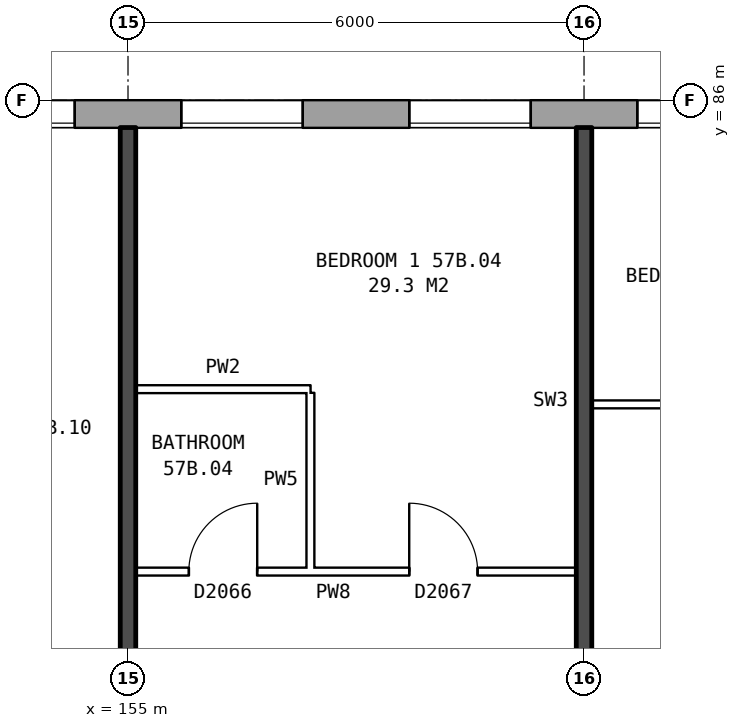
"""IFC4 building model, lengths in metres.
Left out: names, types, materials, properties, quantities, classifications, styles, units other than length and angle.
Written with IfcOpenShell. Run it as: python <this file> out.ifc"""

import sys

from ifc_helpers import new_model, si_unit, direction, frame, frame_2d, origin, place, context, subcontext, project, spatial, rectangle, extrude, element, fill, save


model = new_model("IFC4")
c1 = context("Model", 3, precision=1e-05, world=origin(), true_north=direction((0.0, 1.0)))
c2 = subcontext(c1, "Body", "Model", "MODEL_VIEW")
j1 = project(units=[si_unit("LENGTHUNIT", "METRE"), si_unit("PLANEANGLEUNIT", "RADIAN")], contexts=[c1])
p1 = place(None, origin())
s1 = spatial("IfcSite", under=j1, at=p1, CompositionType="ELEMENT")
p2 = place(p1, origin())
s2 = spatial("IfcBuilding", under=s1, at=p2, CompositionType="ELEMENT")
p3 = place(p2, frame((0.0, 0.0, 202.8)))
s3 = spatial("IfcBuildingStorey", under=s2, at=p3, CompositionType="ELEMENT", Elevation=202.8)
p4 = place(p3, frame((165.925, 85.82, 0.0), z_axis=(0.0, 0.0, 1.0), x_axis=(-1.0, 0.0, 0.0)))
e1 = element("IfcWall", 1, at=p4, inside=s3, PredefinedType="STANDARD", context=c2, shape_type="SweptSolid", body=[
    extrude(rectangle(XDim=33.875, YDim=0.36, at=frame_2d((16.938, 0.0))), origin(), (0.0, 0.0, 1.0), 2.85),
])
p5 = place(p4, frame((2.625, 0.0, 0.8)))
e2 = element("IfcOpeningElement", 2, at=p5, cuts=e1, PredefinedType="OPENING", context=c2, shape_type="SweptSolid", body=[
    extrude(rectangle(XDim=1.6, YDim=1.8, at=frame_2d((0.8, 0.9))), frame((0.0, 0.19, 0.0), z_axis=(0.0, -1.0, 0.0), x_axis=(1.0, 0.0, 0.0)), (0.0, 0.0, 1.0), 0.38),
])
p6 = place(p4, frame((5.625, 0.0, 0.8)))
e3 = element("IfcOpeningElement", 3, at=p6, cuts=e1, PredefinedType="OPENING", context=c2, shape_type="SweptSolid", body=[
    extrude(rectangle(XDim=1.6, YDim=1.8, at=frame_2d((0.8, 0.9))), frame((0.0, 0.19, 0.0), z_axis=(0.0, -1.0, 0.0), x_axis=(1.0, 0.0, 0.0)), (0.0, 0.0, 1.0), 0.38),
])
p7 = place(p4, frame((8.625, 0.0, 0.8)))
e4 = element("IfcOpeningElement", 4, at=p7, cuts=e1, PredefinedType="OPENING", context=c2, shape_type="SweptSolid", body=[
    extrude(rectangle(XDim=1.6, YDim=1.8, at=frame_2d((0.8, 0.9))), frame((0.0, 0.19, 0.0), z_axis=(0.0, -1.0, 0.0), x_axis=(1.0, 0.0, 0.0)), (0.0, 0.0, 1.0), 0.38),
])
p8 = place(p4, frame((11.625, 0.0, 0.8)))
e5 = element("IfcOpeningElement", 5, at=p8, cuts=e1, PredefinedType="OPENING", context=c2, shape_type="SweptSolid", body=[
    extrude(rectangle(XDim=1.6, YDim=1.8, at=frame_2d((0.8, 0.9))), frame((0.0, 0.19, 0.0), z_axis=(0.0, -1.0, 0.0), x_axis=(1.0, 0.0, 0.0)), (0.0, 0.0, 1.0), 0.38),
])
p9 = place(p4, frame((14.625, 0.0, 0.8)))
e6 = element("IfcOpeningElement", 6, at=p9, cuts=e1, PredefinedType="OPENING", context=c2, shape_type="SweptSolid", body=[
    extrude(rectangle(XDim=1.6, YDim=1.8, at=frame_2d((0.8, 0.9))), frame((0.0, 0.19, 0.0), z_axis=(0.0, -1.0, 0.0), x_axis=(1.0, 0.0, 0.0)), (0.0, 0.0, 1.0), 0.38),
])
p10 = place(p4, frame((17.625, 0.0, 0.8)))
e7 = element("IfcOpeningElement", 7, at=p10, cuts=e1, PredefinedType="OPENING", context=c2, shape_type="SweptSolid", body=[
    extrude(rectangle(XDim=1.6, YDim=1.8, at=frame_2d((0.8, 0.9))), frame((0.0, 0.19, 0.0), z_axis=(0.0, -1.0, 0.0), x_axis=(1.0, 0.0, 0.0)), (0.0, 0.0, 1.0), 0.38),
])
p11 = place(p4, frame((20.625, 0.0, 0.8)))
e8 = element("IfcOpeningElement", 8, at=p11, cuts=e1, PredefinedType="OPENING", context=c2, shape_type="SweptSolid", body=[
    extrude(rectangle(XDim=1.6, YDim=1.8, at=frame_2d((0.8, 0.9))), frame((0.0, 0.19, 0.0), z_axis=(0.0, -1.0, 0.0), x_axis=(1.0, 0.0, 0.0)), (0.0, 0.0, 1.0), 0.38),
])
p12 = place(p4, frame((23.625, 0.0, 0.8)))
e9 = element("IfcOpeningElement", 9, at=p12, cuts=e1, PredefinedType="OPENING", context=c2, shape_type="SweptSolid", body=[
    extrude(rectangle(XDim=1.6, YDim=1.8, at=frame_2d((0.8, 0.9))), frame((0.0, 0.19, 0.0), z_axis=(0.0, -1.0, 0.0), x_axis=(1.0, 0.0, 0.0)), (0.0, 0.0, 1.0), 0.38),
])
p13 = place(p4, frame((26.625, 0.0, 0.8)))
e10 = element("IfcOpeningElement", 10, at=p13, cuts=e1, PredefinedType="OPENING", context=c2, shape_type="SweptSolid", body=[
    extrude(rectangle(XDim=1.6, YDim=1.8, at=frame_2d((0.8, 0.9))), frame((0.0, 0.19, 0.0), z_axis=(0.0, -1.0, 0.0), x_axis=(1.0, 0.0, 0.0)), (0.0, 0.0, 1.0), 0.38),
])
p14 = place(p4, frame((29.625, 0.0, 0.8)))
e11 = element("IfcOpeningElement", 11, at=p14, cuts=e1, PredefinedType="OPENING", context=c2, shape_type="SweptSolid", body=[
    extrude(rectangle(XDim=1.6, YDim=1.8, at=frame_2d((0.8, 0.9))), frame((0.0, 0.19, 0.0), z_axis=(0.0, -1.0, 0.0), x_axis=(1.0, 0.0, 0.0)), (0.0, 0.0, 1.0), 0.38),
])
p15 = place(p3, frame((155.1, 79.8, 0.0), z_axis=(0.0, 0.0, 1.0), x_axis=(1.0, 0.0, 0.0)))
e12 = element("IfcWall", 12, at=p15, inside=s3, PredefinedType="PARTITIONING", context=c2, shape_type="SweptSolid", body=[
    extrude(rectangle(XDim=5.8, YDim=0.1, at=frame_2d((2.9, 0.0))), origin(), (0.0, 0.0, 1.0), 2.85),
])
p16 = place(p15, frame((3.6, 0.0, 0.0)))
e13 = element("IfcOpeningElement", 13, at=p16, cuts=e12, PredefinedType="OPENING", context=c2, shape_type="SweptSolid", body=[
    extrude(rectangle(XDim=0.9, YDim=2.1, at=frame_2d((0.45, 1.05))), frame((0.0, 0.06, 0.0), z_axis=(0.0, -1.0, 0.0), x_axis=(1.0, 0.0, 0.0)), (0.0, 0.0, 1.0), 0.12),
])
p17 = place(p15, frame((0.7, 0.0, 0.0)))
e14 = element("IfcOpeningElement", 14, at=p17, cuts=e12, PredefinedType="OPENING", context=c2, shape_type="SweptSolid", body=[
    extrude(rectangle(XDim=0.9, YDim=2.1, at=frame_2d((0.45, 1.05))), frame((0.0, 0.06, 0.0), z_axis=(0.0, -1.0, 0.0), x_axis=(1.0, 0.0, 0.0)), (0.0, 0.0, 1.0), 0.12),
])
p18 = place(p3, frame((161.1, 82.0, 0.0), z_axis=(0.0, 0.0, 1.0), x_axis=(1.0, 0.0, 0.0)))
e15 = element("IfcWall", 15, at=p18, inside=s3, PredefinedType="PARTITIONING", context=c2, shape_type="SweptSolid", body=[
    extrude(rectangle(XDim=7.54, YDim=0.1, at=frame_2d((3.77, 0.0))), origin(), (0.0, 0.0, 1.0), 2.85),
])
p19 = place(p18, frame((3.32, 0.0, 0.0)))
e16 = element("IfcOpeningElement", 16, at=p19, cuts=e15, PredefinedType="OPENING", context=c2, shape_type="SweptSolid", body=[
    extrude(rectangle(XDim=0.9, YDim=2.1, at=frame_2d((0.45, 1.05))), frame((0.0, 0.06, 0.0), z_axis=(0.0, -1.0, 0.0), x_axis=(1.0, 0.0, 0.0)), (0.0, 0.0, 1.0), 0.12),
])
p20 = place(p3, frame((155.1, 82.2, 0.0), z_axis=(0.0, 0.0, 1.0), x_axis=(1.0, 0.0, 0.0)))
e17 = element("IfcWall", 17, at=p20, inside=s3, PredefinedType="PARTITIONING", context=c2, shape_type="SweptSolid", body=[
    extrude(rectangle(XDim=2.3, YDim=0.1, at=frame_2d((1.15, 0.0))), origin(), (0.0, 0.0, 1.0), 2.85),
])
p21 = place(p3, frame((155.0, 71.2, 0.0), z_axis=(0.0, 0.0, 1.0), x_axis=(0.0, 1.0, 0.0)))
e18 = element("IfcWall", 18, at=p21, inside=s3, PredefinedType="SOLIDWALL", context=c2, shape_type="SweptSolid", body=[
    extrude(rectangle(XDim=14.44, YDim=0.2, at=frame_2d((7.22, 0.0))), origin(), (0.0, 0.0, 1.0), 2.85),
])
p22 = place(p3, frame((157.4, 79.85, 0.0), z_axis=(0.0, 0.0, 1.0), x_axis=(0.0, 1.0, 0.0)))
e19 = element("IfcWall", 19, at=p22, inside=s3, PredefinedType="PARTITIONING", context=c2, shape_type="SweptSolid", body=[
    extrude(rectangle(XDim=2.3, YDim=0.1, at=frame_2d((1.15, 0.0))), origin(), (0.0, 0.0, 1.0), 2.85),
])
p23 = place(p3, frame((161.0, 76.2, 0.0), z_axis=(0.0, 0.0, 1.0), x_axis=(0.0, 1.0, 0.0)))
e20 = element("IfcWall", 20, at=p23, inside=s3, PredefinedType="SOLIDWALL", context=c2, shape_type="SweptSolid", body=[
    extrude(rectangle(XDim=9.44, YDim=0.2, at=frame_2d((4.72, 0.0))), origin(), (0.0, 0.0, 1.0), 2.85),
])
p24 = place(p23, frame((1.35, 0.0, 0.0)))
e21 = element("IfcOpeningElement", 21, at=p24, cuts=e20, PredefinedType="OPENING", context=c2, shape_type="SweptSolid", body=[
    extrude(rectangle(XDim=0.9, YDim=2.1, at=frame_2d((0.45, 1.05))), frame((0.0, 0.11, 0.0), z_axis=(0.0, -1.0, 0.0), x_axis=(1.0, 0.0, 0.0)), (0.0, 0.0, 1.0), 0.22),
])
p25 = place(p5, origin())
e22 = element("IfcWindow", 22, at=p25, inside=s3, PartitioningType="SINGLE_PANEL", PredefinedType="WINDOW", context=c2, shape_type="SweptSolid", body=[
    extrude(rectangle(XDim=1.6, YDim=1.8, at=frame_2d((0.8, 0.9))), frame((0.0, 0.15, 0.0), z_axis=(0.0, -1.0, 0.0), x_axis=(1.0, 0.0, 0.0)), (0.0, 0.0, 1.0), 0.06),
])
fill(e2, e22)
p26 = place(p6, origin())
e23 = element("IfcWindow", 23, at=p26, inside=s3, PartitioningType="SINGLE_PANEL", PredefinedType="WINDOW", context=c2, shape_type="SweptSolid", body=[
    extrude(rectangle(XDim=1.6, YDim=1.8, at=frame_2d((0.8, 0.9))), frame((0.0, 0.15, 0.0), z_axis=(0.0, -1.0, 0.0), x_axis=(1.0, 0.0, 0.0)), (0.0, 0.0, 1.0), 0.06),
])
fill(e3, e23)
p27 = place(p7, origin())
e24 = element("IfcWindow", 24, at=p27, inside=s3, PartitioningType="SINGLE_PANEL", PredefinedType="WINDOW", context=c2, shape_type="SweptSolid", body=[
    extrude(rectangle(XDim=1.6, YDim=1.8, at=frame_2d((0.8, 0.9))), frame((0.0, 0.15, 0.0), z_axis=(0.0, -1.0, 0.0), x_axis=(1.0, 0.0, 0.0)), (0.0, 0.0, 1.0), 0.06),
])
fill(e4, e24)
p28 = place(p8, origin())
e25 = element("IfcWindow", 25, at=p28, inside=s3, PartitioningType="SINGLE_PANEL", PredefinedType="WINDOW", context=c2, shape_type="SweptSolid", body=[
    extrude(rectangle(XDim=1.6, YDim=1.8, at=frame_2d((0.8, 0.9))), frame((0.0, 0.15, 0.0), z_axis=(0.0, -1.0, 0.0), x_axis=(1.0, 0.0, 0.0)), (0.0, 0.0, 1.0), 0.06),
])
fill(e5, e25)
p29 = place(p16, origin())
e26 = element("IfcDoor", 26, at=p29, inside=s3, OperationType="SINGLE_SWING_LEFT", PredefinedType="DOOR", context=c2, shape_type="SweptSolid", body=[
    extrude(rectangle(XDim=0.9, YDim=2.1, at=frame_2d((0.45, 1.05))), frame((0.0, 0.025, 0.0), z_axis=(0.0, -1.0, 0.0), x_axis=(1.0, 0.0, 0.0)), (0.0, 0.0, 1.0), 0.05),
])
fill(e13, e26)
p30 = place(p17, origin())
e27 = element("IfcDoor", 27, at=p30, inside=s3, OperationType="SINGLE_SWING_RIGHT", PredefinedType="DOOR", context=c2, shape_type="SweptSolid", body=[
    extrude(rectangle(XDim=0.9, YDim=2.1, at=frame_2d((0.45, 1.05))), frame((0.0, 0.025, 0.0), z_axis=(0.0, -1.0, 0.0), x_axis=(1.0, 0.0, 0.0)), (0.0, 0.0, 1.0), 0.05),
])
fill(e14, e27)
save(model, sys.argv[1])
